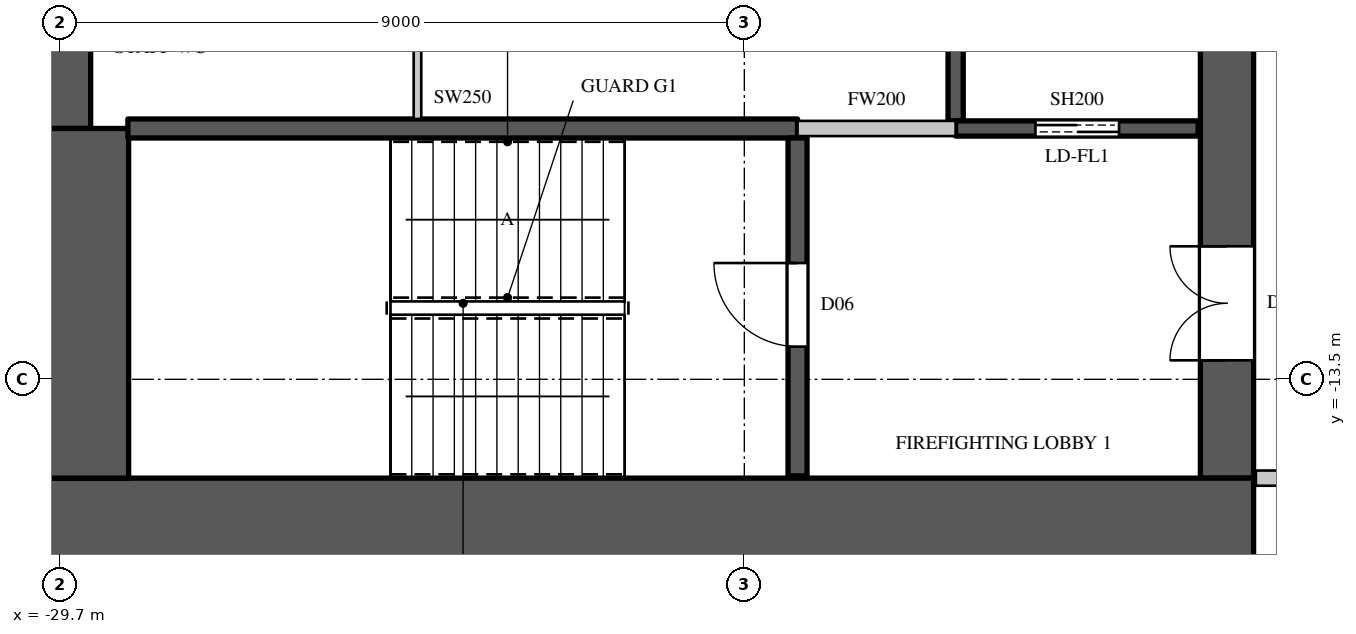
"""IFC4 building model, lengths in metres.
Left out: names, types, materials, properties, quantities, classifications, styles, units other than length and angle.
Written with IfcOpenShell. Run it as: python <this file> out.ifc"""

import sys

from ifc_helpers import new_model, si_unit, direction, frame, frame_2d, origin, place, context, subcontext, project, spatial, rectangle, extrude, element, fill, save


model = new_model("IFC4")
c1 = context("Model", 3, precision=1e-05, world=origin(), true_north=direction((0.0, 1.0)))
c2 = subcontext(c1, "Body", "Model", "MODEL_VIEW")
j1 = project(units=[si_unit("LENGTHUNIT", "METRE"), si_unit("PLANEANGLEUNIT", "RADIAN")], contexts=[c1])
p1 = place(None, origin())
s1 = spatial("IfcSite", under=j1, at=p1, CompositionType="ELEMENT")
p2 = place(p1, origin())
s2 = spatial("IfcBuilding", under=s1, at=p2, CompositionType="ELEMENT")
p3 = place(p2, frame((0.0, 0.0, 272.1)))
s3 = spatial("IfcBuildingStorey", under=s2, at=p3, CompositionType="ELEMENT", Elevation=272.1)
p4 = place(p3, frame((-30.0, -15.4, 0.0), z_axis=(0.0, 0.0, 1.0), x_axis=(1.0, 0.0, 0.0)))
e1 = element("IfcWall", 1, at=p4, inside=s3, PredefinedType="SHEAR", context=c2, shape_type="SweptSolid", body=[
    extrude(rectangle(XDim=16.0, YDim=1.2, at=frame_2d((8.0, 0.0))), origin(), (0.0, 0.0, 1.0), 4.1),
])
p5 = place(p3, frame((-14.35, -14.8, 0.0), z_axis=(0.0, 0.0, 1.0), x_axis=(0.0, 1.0, 0.0)))
e2 = element("IfcWall", 2, at=p5, inside=s3, PredefinedType="SHEAR", context=c2, shape_type="SweptSolid", body=[
    extrude(rectangle(XDim=29.6, YDim=0.7, at=frame_2d((14.8, 0.0))), origin(), (0.0, 0.0, 1.0), 4.1),
])
p6 = place(p5, frame((1.55, 0.0, 0.0)))
e3 = element("IfcOpeningElement", 3, at=p6, cuts=e2, PredefinedType="OPENING", context=c2, shape_type="SweptSolid", body=[
    extrude(rectangle(XDim=1.5, YDim=2.4, at=frame_2d((0.75, 1.2))), frame((0.0, 0.36, 0.0), z_axis=(0.0, -1.0, 0.0), x_axis=(1.0, 0.0, 0.0)), (0.0, 0.0, 1.0), 0.72),
])
p7 = place(p5, frame((26.55, 0.0, 0.0)))
e4 = element("IfcOpeningElement", 4, at=p7, cuts=e2, PredefinedType="OPENING", context=c2, shape_type="SweptSolid", body=[
    extrude(rectangle(XDim=1.5, YDim=2.4, at=frame_2d((0.75, 1.2))), frame((0.0, 0.36, 0.0), z_axis=(0.0, -1.0, 0.0), x_axis=(1.0, 0.0, 0.0)), (0.0, 0.0, 1.0), 0.72),
])
p8 = place(p5, frame((8.45, 0.0, 0.0)))
e5 = element("IfcOpeningElement", 5, at=p8, cuts=e2, PredefinedType="OPENING", context=c2, shape_type="SweptSolid", body=[
    extrude(rectangle(XDim=1.5, YDim=2.4, at=frame_2d((0.75, 1.2))), frame((0.0, 0.36, 0.0), z_axis=(0.0, -1.0, 0.0), x_axis=(1.0, 0.0, 0.0)), (0.0, 0.0, 1.0), 0.72),
])
p9 = place(p5, frame((19.65, 0.0, 0.0)))
e6 = element("IfcOpeningElement", 6, at=p9, cuts=e2, PredefinedType="OPENING", context=c2, shape_type="SweptSolid", body=[
    extrude(rectangle(XDim=1.5, YDim=2.4, at=frame_2d((0.75, 1.2))), frame((0.0, 0.36, 0.0), z_axis=(0.0, -1.0, 0.0), x_axis=(1.0, 0.0, 0.0)), (0.0, 0.0, 1.0), 0.72),
])
p10 = place(p5, frame((14.5, 0.0, 0.0)))
e7 = element("IfcOpeningElement", 7, at=p10, cuts=e2, PredefinedType="OPENING", context=c2, shape_type="SweptSolid", body=[
    extrude(rectangle(XDim=0.6, YDim=2.0, at=frame_2d((0.3, 1.0))), frame((0.0, 0.36, 0.0), z_axis=(0.0, -1.0, 0.0), x_axis=(1.0, 0.0, 0.0)), (0.0, 0.0, 1.0), 0.72),
])
p11 = place(p3, frame((-29.65, -10.2, 0.0), z_axis=(0.0, 0.0, 1.0), x_axis=(0.0, 1.0, 0.0)))
e8 = element("IfcWall", 8, at=p11, inside=s3, PredefinedType="SHEAR", context=c2, shape_type="SweptSolid", body=[
    extrude(rectangle(XDim=20.4, YDim=0.7, at=frame_2d((10.2, 0.0))), origin(), (0.0, 0.0, 1.0), 4.1),
])
p12 = place(p3, frame((-29.4, -14.8, 0.0), z_axis=(0.0, 0.0, 1.0), x_axis=(0.0, 1.0, 0.0)))
e9 = element("IfcWall", 9, at=p12, inside=s3, PredefinedType="SHEAR", context=c2, shape_type="SweptSolid", body=[
    extrude(rectangle(XDim=4.6, YDim=1.2, at=frame_2d((2.3, 0.0))), origin(), (0.0, 0.0, 1.0), 4.1),
])
p13 = place(p3, frame((-20.0, -10.2, 0.0), z_axis=(0.0, 0.0, 1.0), x_axis=(1.0, 0.0, 0.0)))
e10 = element("IfcWall", 10, at=p13, inside=s3, PredefinedType="PARTITIONING", context=c2, shape_type="SweptSolid", body=[
    extrude(rectangle(XDim=2.08, YDim=0.2, at=frame_2d((1.04, 0.0))), origin(), (0.0, 0.0, 1.0), 3.8),
])
p14 = place(p3, frame((-13.97, -14.8, 0.0), z_axis=(0.0, 0.0, 1.0), x_axis=(1.0, 0.0, 0.0)))
e11 = element("IfcWall", 11, at=p14, inside=s3, PredefinedType="PARTITIONING", context=c2, shape_type="SweptSolid", body=[
    extrude(rectangle(XDim=2.87, YDim=0.2, at=frame_2d((1.435, 0.0))), origin(), (0.0, 0.0, 1.0), 3.8),
])
p15 = place(p3, frame((-17.92, -10.1, 0.0), z_axis=(0.0, 0.0, 1.0), x_axis=(0.0, 1.0, 0.0)))
e12 = element("IfcWall", 12, at=p15, inside=s3, PredefinedType="SHEAR", context=c2, shape_type="SweptSolid", body=[
    extrude(rectangle(XDim=2.6, YDim=0.2, at=frame_2d((1.3, 0.0))), origin(), (0.0, 0.0, 1.0), 3.8),
])
p16 = place(p3, frame((-17.92, -10.2, 0.0), z_axis=(0.0, 0.0, 1.0), x_axis=(1.0, 0.0, 0.0)))
e13 = element("IfcWall", 13, at=p16, inside=s3, PredefinedType="SHEAR", context=c2, shape_type="SweptSolid", body=[
    extrude(rectangle(XDim=3.19, YDim=0.2, at=frame_2d((1.595, 0.0))), origin(), (0.0, 0.0, 1.0), 3.8),
])
p17 = place(p16, frame((1.05, 0.0, 0.0)))
e14 = element("IfcOpeningElement", 14, at=p17, cuts=e13, PredefinedType="OPENING", context=c2, shape_type="SweptSolid", body=[
    extrude(rectangle(XDim=1.1, YDim=2.2, at=frame_2d((0.55, 1.1))), frame((0.0, 0.11, 0.0), z_axis=(0.0, -1.0, 0.0), x_axis=(1.0, 0.0, 0.0)), (0.0, 0.0, 1.0), 0.22),
])
p18 = place(p3, frame((-28.81, -10.2, 0.0), z_axis=(0.0, 0.0, 1.0), x_axis=(1.0, 0.0, 0.0)))
e15 = element("IfcWall", 15, at=p18, inside=s3, PredefinedType="SHEAR", context=c2, shape_type="SweptSolid", body=[
    extrude(rectangle(XDim=8.81, YDim=0.25, at=frame_2d((4.405, 0.0))), origin(), (0.0, 0.0, 1.0), 3.8),
])
p19 = place(p3, frame((-20.0, -14.77, 0.0), z_axis=(0.0, 0.0, 1.0), x_axis=(0.0, 1.0, 0.0)))
e16 = element("IfcWall", 16, at=p19, inside=s3, PredefinedType="SHEAR", context=c2, shape_type="SweptSolid", body=[
    extrude(rectangle(XDim=4.445, YDim=0.25, at=frame_2d((2.223, 0.0))), origin(), (0.0, 0.0, 1.0), 3.8),
])
p20 = place(p19, frame((1.7, 0.0, 0.0)))
e17 = element("IfcOpeningElement", 17, at=p20, cuts=e16, PredefinedType="OPENING", context=c2, shape_type="SweptSolid", body=[
    extrude(rectangle(XDim=1.1, YDim=2.2, at=frame_2d((0.55, 1.1))), frame((0.0, 0.135, 0.0), z_axis=(0.0, -1.0, 0.0), x_axis=(1.0, 0.0, 0.0)), (0.0, 0.0, 1.0), 0.27),
])
p21 = place(p3, frame((-25.0, -10.075, 0.0), z_axis=(0.0, 0.0, 1.0), x_axis=(0.0, 1.0, 0.0)))
e18 = element("IfcWall", 18, at=p21, inside=s3, PredefinedType="PARTITIONING", context=c2, shape_type="SweptSolid", body=[
    extrude(rectangle(XDim=2.575, YDim=0.1, at=frame_2d((1.288, 0.0))), origin(), (0.0, 0.0, 1.0), 3.8),
])
p22 = place(p20, origin())
e19 = element("IfcDoor", 19, at=p22, inside=s3, OperationType="SINGLE_SWING_RIGHT", PredefinedType="DOOR", context=c2, shape_type="SweptSolid", body=[
    extrude(rectangle(XDim=1.1, YDim=2.2, at=frame_2d((0.55, 1.1))), frame((0.0, 0.025, 0.0), z_axis=(0.0, -1.0, 0.0), x_axis=(1.0, 0.0, 0.0)), (0.0, 0.0, 1.0), 0.05),
])
fill(e17, e19)
p23 = place(p17, origin())
e20 = element("IfcDoor", 20, at=p23, inside=s3, OperationType="DOUBLE_DOOR_SLIDING", PredefinedType="DOOR", context=c2, shape_type="SweptSolid", body=[
    extrude(rectangle(XDim=1.1, YDim=2.2, at=frame_2d((0.55, 1.1))), frame((0.0, 0.025, 0.0), z_axis=(0.0, -1.0, 0.0), x_axis=(1.0, 0.0, 0.0)), (0.0, 0.0, 1.0), 0.05),
])
fill(e14, e20)
p24 = place(p6, origin())
e21 = element("IfcDoor", 21, at=p24, inside=s3, OperationType="DOUBLE_DOOR_SINGLE_SWING", PredefinedType="DOOR", context=c2, shape_type="SweptSolid", body=[
    extrude(rectangle(XDim=1.5, YDim=2.4, at=frame_2d((0.75, 1.2))), frame((0.0, 0.345, 0.0), z_axis=(0.0, -1.0, 0.0), x_axis=(1.0, 0.0, 0.0)), (0.0, 0.0, 1.0), 0.05),
])
fill(e3, e21)
save(model, sys.argv[1])
